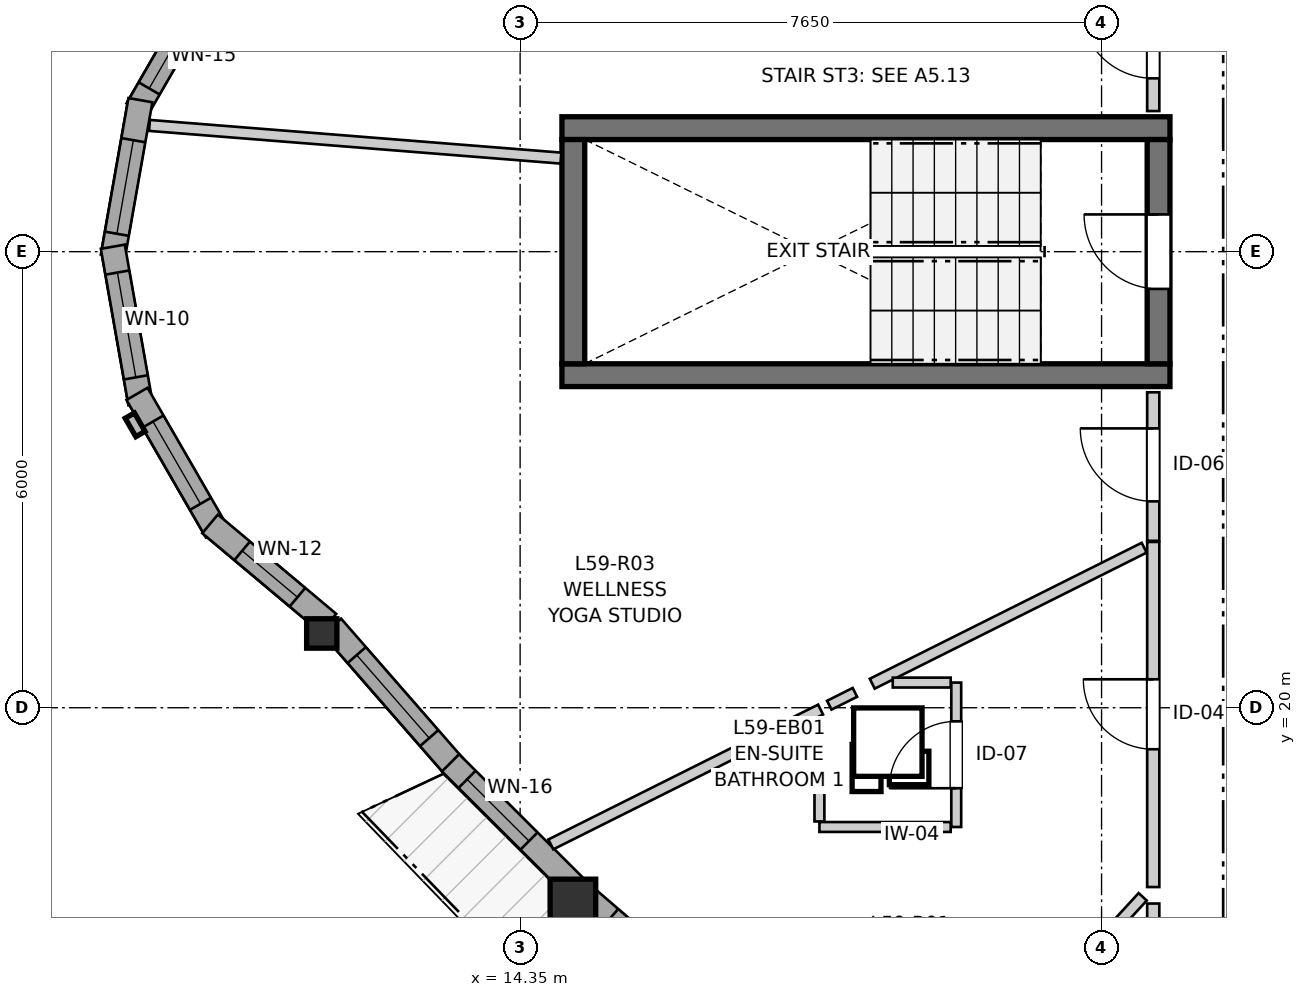
"""IFC4 building model, lengths in metres.
Left out: names, types, materials, properties, quantities, classifications, styles, units other than length and angle.
Written with IfcOpenShell. Run it as: python <this file> out.ifc"""

import sys

from ifc_helpers import new_model, si_unit, direction, frame, frame_2d, origin, origin_2d, place, context, subcontext, project, spatial, rectangle, i_section, extrude, source, transform, mapped, element, fill, save


model = new_model("IFC4")
c1 = context("Model", 3, precision=1e-05, world=origin(), true_north=direction((0.0, 1.0)))
c2 = subcontext(c1, "Body", "Model", "MODEL_VIEW")
j1 = project(units=[si_unit("LENGTHUNIT", "METRE"), si_unit("PLANEANGLEUNIT", "RADIAN")], contexts=[c1])
p1 = place(None, origin())
s1 = spatial("IfcSite", under=j1, at=p1, CompositionType="ELEMENT")
p2 = place(p1, origin())
s2 = spatial("IfcBuilding", under=s1, at=p2, CompositionType="ELEMENT")
p3 = place(p2, frame((0.0, 0.0, 198.8)))
s3 = spatial("IfcBuildingStorey", under=s2, at=p3, CompositionType="ELEMENT", Elevation=198.8)
for number, where, z_axis, x_axis in (
    (1, (14.9, 24.375, 0.0), (0.0, 0.0, 1.0), (1.0, 0.0, 0.0)),
    (2, (22.9, 27.625, 0.0), (0.0, 0.0, 1.0), (-1.0, 0.0, 0.0)),
):
    element("IfcWall", number, at=place(p3, frame(where, z_axis=z_axis, x_axis=x_axis)), inside=s3, PredefinedType="SHEAR", context=c2, shape_type="SweptSolid", body=[
        extrude(rectangle(XDim=8.0, YDim=0.3, at=frame_2d((4.0, 0.0))), origin(), (0.0, 0.0, 1.0), 2.96),
    ])
p4 = place(p3, frame((15.05, 27.475, 0.0), z_axis=(0.0, 0.0, 1.0), x_axis=(0.0, -1.0, 0.0)))
e3 = element("IfcWall", 3, at=p4, inside=s3, PredefinedType="SHEAR", context=c2, shape_type="SweptSolid", body=[
    extrude(rectangle(XDim=2.95, YDim=0.3, at=frame_2d((1.475, 0.0))), origin(), (0.0, 0.0, 1.0), 2.96),
])
p5 = place(p3, frame((22.75, 24.525, 0.0), z_axis=(0.0, 0.0, 1.0), x_axis=(0.0, 1.0, 0.0)))
e4 = element("IfcWall", 4, at=p5, inside=s3, PredefinedType="SHEAR", context=c2, shape_type="SweptSolid", body=[
    extrude(rectangle(XDim=2.95, YDim=0.3, at=frame_2d((1.475, 0.0))), origin(), (0.0, 0.0, 1.0), 2.96),
])
p6 = place(p5, frame((0.985, 0.0, 0.0)))
e5 = element("IfcOpeningElement", 5, at=p6, cuts=e4, PredefinedType="OPENING", context=c2, shape_type="SweptSolid", body=[
    extrude(rectangle(XDim=0.98, YDim=2.15, at=frame_2d((0.49, 1.075))), frame((0.0, 0.16, 0.0), z_axis=(0.0, -1.0, 0.0), x_axis=(1.0, 0.0, 0.0)), (0.0, 0.0, 1.0), 0.32),
])
m1 = source(origin(), c2, "Body", "SweptSolid", [
    extrude(i_section(OverallWidth=0.398, OverallDepth=0.387, WebThickness=0.019, FlangeThickness=0.03, FilletRadius=0.015, at=origin_2d()), origin(), (0.0, 0.0, 1.0), 2.96),
])
p7 = place(p3, frame((11.74, 20.977, 0.0), z_axis=(0.0, 0.0, 1.0), x_axis=(1.0, 0.0, 0.0)))
e6 = element("IfcColumn", 6, at=p7, inside=s3, PredefinedType="PILASTER", context=c2, shape_type="MappedRepresentation", body=[
    mapped(m1, transform((0.0, 0.0, 0.0), x_axis=(1.0, 0.0, 0.0), y_axis=(0.0, 1.0, 0.0), z_axis=(0.0, 0.0, 1.0), scale=1.0)),
])
m2 = source(origin(), c2, "Body", "SweptSolid", [
    extrude(rectangle(XDim=0.6, YDim=0.6, at=origin_2d()), origin(), (0.0, 0.0, 1.0), 2.96),
])
p8 = place(p3, frame((15.044, 17.445, 0.0), z_axis=(0.0, 0.0, 1.0), x_axis=(1.0, 0.0, 0.0)))
e7 = element("IfcColumn", 7, at=p8, inside=s3, PredefinedType="COLUMN", context=c2, shape_type="MappedRepresentation", body=[
    mapped(m2, transform((0.0, 0.0, 0.0), x_axis=(1.0, 0.0, 0.0), y_axis=(0.0, 1.0, 0.0), z_axis=(0.0, 0.0, 1.0), scale=1.0)),
])
p9 = place(p3, frame((10.354, 29.681, 0.0), z_axis=(0.0, 0.0, 1.0), x_axis=(-0.499995423472, -0.866028046028, 0.0)))
e8 = element("IfcWall", 8, at=p9, inside=s3, PredefinedType="SOLIDWALL", context=c2, shape_type="SweptSolid", body=[
    extrude(rectangle(XDim=2.09, YDim=0.32, at=frame_2d((1.045, 0.0))), origin(), (0.0, 0.0, 1.0), 2.58),
])
p10 = place(p9, frame((0.32, 0.0, 0.82)))
e9 = element("IfcOpeningElement", 9, at=p10, cuts=e8, PredefinedType="OPENING", context=c2, shape_type="SweptSolid", body=[
    extrude(rectangle(XDim=1.45, YDim=1.25, at=frame_2d((0.725, 0.625))), frame((0.0, 0.17, 0.0), z_axis=(0.0, -1.0, 0.0), x_axis=(1.0, 0.0, 0.0)), (0.0, 0.0, 1.0), 0.34),
])
p11 = place(p3, frame((9.354, 27.993, 0.0), z_axis=(0.0, 0.0, 1.0), x_axis=(-0.173672066494, -0.984803540469, 0.0)))
e10 = element("IfcWall", 10, at=p11, inside=s3, PredefinedType="SOLIDWALL", context=c2, shape_type="SweptSolid", body=[
    extrude(rectangle(XDim=2.09, YDim=0.32, at=frame_2d((1.045, 0.0))), origin(), (0.0, 0.0, 1.0), 2.58),
])
p12 = place(p11, frame((0.535, 0.0, 0.82)))
e11 = element("IfcOpeningElement", 11, at=p12, cuts=e10, PredefinedType="OPENING", context=c2, shape_type="SweptSolid", body=[
    extrude(rectangle(XDim=1.25, YDim=1.35, at=frame_2d((0.625, 0.675))), frame((0.0, 0.17, 0.0), z_axis=(0.0, -1.0, 0.0), x_axis=(1.0, 0.0, 0.0)), (0.0, 0.0, 1.0), 0.34),
])
p13 = place(p3, frame((8.991, 26.065, 0.0), z_axis=(0.0, 0.0, 1.0), x_axis=(0.173672066494, -0.984803540469, 0.0)))
e12 = element("IfcWall", 12, at=p13, inside=s3, PredefinedType="SOLIDWALL", context=c2, shape_type="SweptSolid", body=[
    extrude(rectangle(XDim=2.09, YDim=0.32, at=frame_2d((1.045, 0.0))), origin(), (0.0, 0.0, 1.0), 2.58),
])
p14 = place(p13, frame((0.345, 0.0, 0.82)))
e13 = element("IfcOpeningElement", 13, at=p14, cuts=e12, PredefinedType="OPENING", context=c2, shape_type="SweptSolid", body=[
    extrude(rectangle(XDim=1.4, YDim=1.35, at=frame_2d((0.7, 0.675))), frame((0.0, 0.17, 0.0), z_axis=(0.0, -1.0, 0.0), x_axis=(1.0, 0.0, 0.0)), (0.0, 0.0, 1.0), 0.34),
])
p15 = place(p3, frame((9.309, 24.129, 0.0), z_axis=(0.0, 0.0, 1.0), x_axis=(0.499995423472, -0.866028046028, 0.0)))
e14 = element("IfcWall", 14, at=p15, inside=s3, PredefinedType="SOLIDWALL", context=c2, shape_type="SweptSolid", body=[
    extrude(rectangle(XDim=2.09, YDim=0.32, at=frame_2d((1.045, 0.0))), origin(), (0.0, 0.0, 1.0), 2.58),
])
p16 = place(p15, frame((0.42, 0.0, 0.82)))
e15 = element("IfcOpeningElement", 15, at=p16, cuts=e14, PredefinedType="OPENING", context=c2, shape_type="SweptSolid", body=[
    extrude(rectangle(XDim=1.25, YDim=1.35, at=frame_2d((0.625, 0.675))), frame((0.0, 0.17, 0.0), z_axis=(0.0, -1.0, 0.0), x_axis=(1.0, 0.0, 0.0)), (0.0, 0.0, 1.0), 0.34),
])
p17 = place(p3, frame((10.271, 22.419, 0.0), z_axis=(0.0, 0.0, 1.0), x_axis=(0.766099948115, -0.642721455608, 0.0)))
e16 = element("IfcWall", 16, at=p17, inside=s3, PredefinedType="SOLIDWALL", context=c2, shape_type="SweptSolid", body=[
    extrude(rectangle(XDim=2.032, YDim=0.32, at=frame_2d((1.016, 0.0))), origin(), (0.0, 0.0, 1.0), 2.58),
])
p18 = place(p17, frame((0.551, 0.0, 0.82)))
e17 = element("IfcOpeningElement", 17, at=p18, cuts=e16, PredefinedType="OPENING", context=c2, shape_type="SweptSolid", body=[
    extrude(rectangle(XDim=0.95, YDim=1.35, at=frame_2d((0.475, 0.675))), frame((0.0, 0.17, 0.0), z_axis=(0.0, -1.0, 0.0), x_axis=(1.0, 0.0, 0.0)), (0.0, 0.0, 1.0), 0.34),
])
p19 = place(p3, frame((11.874, 21.067, 0.0), z_axis=(0.0, 0.0, 1.0), x_axis=(0.657571063417, -0.753392524888, 0.0)))
e18 = element("IfcWall", 18, at=p19, inside=s3, PredefinedType="SOLIDWALL", context=c2, shape_type="SweptSolid", body=[
    extrude(rectangle(XDim=2.464, YDim=0.32, at=frame_2d((1.232, 0.0))), origin(), (0.0, 0.0, 1.0), 2.58),
])
p20 = place(p19, frame((0.497, 0.0, 0.82)))
e19 = element("IfcOpeningElement", 19, at=p20, cuts=e18, PredefinedType="OPENING", context=c2, shape_type="SweptSolid", body=[
    extrude(rectangle(XDim=1.45, YDim=1.25, at=frame_2d((0.725, 0.625))), frame((0.0, 0.17, 0.0), z_axis=(0.0, -1.0, 0.0), x_axis=(1.0, 0.0, 0.0)), (0.0, 0.0, 1.0), 0.34),
])
p21 = place(p3, frame((13.434, 19.275, 0.0), z_axis=(0.0, 0.0, 1.0), x_axis=(0.708408377073, -0.705802784985, 0.0)))
e20 = element("IfcWall", 20, at=p21, inside=s3, PredefinedType="SOLIDWALL", context=c2, shape_type="SweptSolid", body=[
    extrude(rectangle(XDim=2.343, YDim=0.32, at=frame_2d((1.171, 0.0))), origin(), (0.0, 0.0, 1.0), 2.58),
])
p22 = place(p21, frame((0.308, 0.0, 0.82)))
e21 = element("IfcOpeningElement", 21, at=p22, cuts=e20, PredefinedType="OPENING", context=c2, shape_type="SweptSolid", body=[
    extrude(rectangle(XDim=1.15, YDim=1.2, at=frame_2d((0.575, 0.6))), frame((0.0, 0.17, 0.0), z_axis=(0.0, -1.0, 0.0), x_axis=(1.0, 0.0, 0.0)), (0.0, 0.0, 1.0), 0.34),
])
p23 = place(p3, frame((15.217, 17.507, 0.0), z_axis=(0.0, 0.0, 1.0), x_axis=(0.757473216355, -0.652866239366, 0.0)))
e22 = element("IfcWall", 22, at=p23, inside=s3, PredefinedType="SOLIDWALL", context=c2, shape_type="SweptSolid", body=[
    extrude(rectangle(XDim=2.303, YDim=0.32, at=frame_2d((1.152, 0.0))), origin(), (0.0, 0.0, 1.0), 2.58),
])
p24 = place(p23, frame((0.422, 0.0, 0.82)))
e23 = element("IfcOpeningElement", 23, at=p24, cuts=e22, PredefinedType="OPENING", context=c2, shape_type="SweptSolid", body=[
    extrude(rectangle(XDim=1.45, YDim=1.25, at=frame_2d((0.725, 0.625))), frame((0.0, 0.17, 0.0), z_axis=(0.0, -1.0, 0.0), x_axis=(1.0, 0.0, 0.0)), (0.0, 0.0, 1.0), 0.34),
])
p25 = place(p3, frame((22.68, 17.641, 0.0), z_axis=(0.0, 0.0, 1.0), x_axis=(0.0, 1.0, 0.0)))
e24 = element("IfcWall", 24, at=p25, inside=s3, PredefinedType="PARTITIONING", context=c2, shape_type="SweptSolid", body=[
    extrude(rectangle(XDim=4.54, YDim=0.16, at=frame_2d((2.27, 0.0))), origin(), (0.0, 0.0, 1.0), 2.96),
])
p26 = place(p25, frame((1.813, 0.0, 0.0)))
e25 = element("IfcOpeningElement", 25, at=p26, cuts=e24, PredefinedType="OPENING", context=c2, shape_type="SweptSolid", body=[
    extrude(rectangle(XDim=0.92, YDim=2.1, at=frame_2d((0.46, 1.05))), frame((0.0, 0.09, 0.0), z_axis=(0.0, -1.0, 0.0), x_axis=(1.0, 0.0, 0.0)), (0.0, 0.0, 1.0), 0.18),
])
p27 = place(p3, frame((22.68, 22.196, 0.0), z_axis=(0.0, 0.0, 1.0), x_axis=(0.0, 1.0, 0.0)))
e26 = element("IfcWall", 26, at=p27, inside=s3, PredefinedType="PARTITIONING", context=c2, shape_type="SweptSolid", body=[
    extrude(rectangle(XDim=1.954, YDim=0.16, at=frame_2d((0.977, 0.0))), origin(), (0.0, 0.0, 1.0), 2.96),
])
p28 = place(p27, frame((0.519, 0.0, 0.0)))
e27 = element("IfcOpeningElement", 27, at=p28, cuts=e26, PredefinedType="OPENING", context=c2, shape_type="SweptSolid", body=[
    extrude(rectangle(XDim=0.96, YDim=2.1, at=frame_2d((0.48, 1.05))), frame((0.0, 0.09, 0.0), z_axis=(0.0, -1.0, 0.0), x_axis=(1.0, 0.0, 0.0)), (0.0, 0.0, 1.0), 0.18),
])
p29 = place(p3, frame((20.088, 18.431, 0.0), z_axis=(0.0, 0.0, 1.0), x_axis=(0.0, 1.0, 0.0)))
e28 = element("IfcWall", 28, at=p29, inside=s3, PredefinedType="PARTITIONING", context=c2, shape_type="SweptSolid", body=[
    extrude(rectangle(XDim=1.9, YDim=0.13, at=frame_2d((0.95, 0.0))), origin(), (0.0, 0.0, 1.0), 2.96),
])
p30 = place(p29, frame((0.51, 0.0, 0.0)))
e29 = element("IfcOpeningElement", 29, at=p30, cuts=e28, PredefinedType="OPENING", context=c2, shape_type="SweptSolid", body=[
    extrude(rectangle(XDim=0.88, YDim=2.05, at=frame_2d((0.44, 1.025))), frame((0.0, 0.075, 0.0), z_axis=(0.0, -1.0, 0.0), x_axis=(1.0, 0.0, 0.0)), (0.0, 0.0, 1.0), 0.15),
])
p31 = place(p3, frame((22.68, 27.85, 0.0), z_axis=(0.0, 0.0, 1.0), x_axis=(0.0, 1.0, 0.0)))
e30 = element("IfcWall", 30, at=p31, inside=s3, PredefinedType="PARTITIONING", context=c2, shape_type="SweptSolid", body=[
    extrude(rectangle(XDim=1.731, YDim=0.16, at=frame_2d((0.865, 0.0))), origin(), (0.0, 0.0, 1.0), 2.96),
])
p32 = place(p31, frame((0.43, 0.0, 0.0)))
e31 = element("IfcOpeningElement", 31, at=p32, cuts=e30, PredefinedType="OPENING", context=c2, shape_type="SweptSolid", body=[
    extrude(rectangle(XDim=0.96, YDim=2.1, at=frame_2d((0.48, 1.05))), frame((0.0, 0.09, 0.0), z_axis=(0.0, -1.0, 0.0), x_axis=(1.0, 0.0, 0.0)), (0.0, 0.0, 1.0), 0.18),
])
p33 = place(p3, frame((9.473, 27.661, 0.0), z_axis=(0.0, 0.0, 1.0), x_axis=(0.996864548282, -0.079126938392, 0.0)))
e32 = element("IfcWall", 32, at=p33, inside=s3, PredefinedType="PARTITIONING", context=c2, shape_type="SweptSolid", body=[
    extrude(rectangle(XDim=5.43, YDim=0.145, at=frame_2d((2.715, 0.0))), origin(), (0.0, 0.0, 1.0), 2.96),
])
p34 = place(p3, frame((19.625, 14.343, 0.0), z_axis=(0.0, 0.0, 1.0), x_axis=(0.677104421975, 0.735886949023, 0.0)))
e33 = element("IfcWall", 33, at=p34, inside=s3, PredefinedType="PARTITIONING", context=c2, shape_type="SweptSolid", body=[
    extrude(rectangle(XDim=4.307, YDim=0.145, at=frame_2d((2.153, 0.0))), origin(), (0.0, 0.0, 1.0), 2.96),
])
p35 = place(p3, frame((18.983, 20.316, 0.0), z_axis=(0.0, 0.0, 1.0), x_axis=(0.894366146285, 0.447335664104, 0.0)))
e34 = element("IfcWall", 34, at=p35, inside=s3, PredefinedType="PARTITIONING", context=c2, shape_type="SweptSolid", body=[
    extrude(rectangle(XDim=4.0, YDim=0.145, at=frame_2d((2.0, 0.0))), origin(), (0.0, 0.0, 1.0), 2.96),
])
p36 = place(p3, frame((14.754, 18.202, 0.0), z_axis=(0.0, 0.0, 1.0), x_axis=(0.894464106055, 0.44713975777, 0.0)))
e35 = element("IfcWall", 35, at=p36, inside=s3, PredefinedType="PARTITIONING", context=c2, shape_type="SweptSolid", body=[
    extrude(rectangle(XDim=3.968, YDim=0.145, at=frame_2d((1.984, 0.0))), origin(), (0.0, 0.0, 1.0), 2.96),
])
p37 = place(p3, frame((22.68, 15.796, 0.0), z_axis=(0.0, 0.0, 1.0), x_axis=(0.0, 1.0, 0.0)))
e36 = element("IfcWall", 36, at=p37, inside=s3, PredefinedType="PARTITIONING", context=c2, shape_type="SweptSolid", body=[
    extrude(rectangle(XDim=1.628, YDim=0.16, at=frame_2d((0.814, 0.0))), origin(), (0.0, 0.0, 1.0), 2.96),
])
p38 = place(p3, frame((18.288, 18.431, 0.0), z_axis=(0.0, 0.0, 1.0), x_axis=(1.0, 0.0, 0.0)))
e37 = element("IfcWall", 37, at=p38, inside=s3, PredefinedType="PARTITIONING", context=c2, shape_type="SweptSolid", body=[
    extrude(rectangle(XDim=1.727, YDim=0.13, at=frame_2d((0.863, 0.0))), origin(), (0.0, 0.0, 1.0), 2.96),
])
p39 = place(p3, frame((18.288, 18.504, 0.0), z_axis=(0.0, 0.0, 1.0), x_axis=(0.0, 1.0, 0.0)))
e38 = element("IfcWall", 38, at=p39, inside=s3, PredefinedType="PARTITIONING", context=c2, shape_type="SweptSolid", body=[
    extrude(rectangle(XDim=1.344, YDim=0.13, at=frame_2d((0.672, 0.0))), origin(), (0.0, 0.0, 1.0), 2.96),
])
p40 = place(p3, frame((19.253, 20.331, 0.0), z_axis=(0.0, 0.0, 1.0), x_axis=(1.0, 0.0, 0.0)))
e39 = element("IfcWall", 39, at=p40, inside=s3, PredefinedType="PARTITIONING", context=c2, shape_type="SweptSolid", body=[
    extrude(rectangle(XDim=0.762, YDim=0.13, at=frame_2d((0.381, 0.0))), origin(), (0.0, 0.0, 1.0), 2.96),
])
p41 = place(p3, frame((18.417, 20.033, 0.0), z_axis=(0.0, 0.0, 1.0), x_axis=(0.894427191, 0.4472135955, 0.0)))
e40 = element("IfcWall", 40, at=p41, inside=s3, PredefinedType="PARTITIONING", context=c2, shape_type="SweptSolid", body=[
    extrude(rectangle(XDim=0.377, YDim=0.13, at=frame_2d((0.188, 0.0))), origin(), (0.0, 0.0, 1.0), 2.96),
])
m3 = source(origin(), c2, "Body", "SweptSolid", [
    extrude(rectangle(XDim=1.45, YDim=1.25, at=frame_2d((0.725, 0.625))), frame((0.0, 0.03, 0.0), z_axis=(0.0, -1.0, 0.0), x_axis=(1.0, 0.0, 0.0)), (0.0, 0.0, 1.0), 0.06),
])
p42 = place(p10, origin())
e41 = element("IfcWindow", 41, at=p42, inside=s3, PartitioningType="SINGLE_PANEL", PredefinedType="WINDOW", context=c2, shape_type="MappedRepresentation", body=[
    mapped(m3, transform((0.0, 0.0, 0.0), x_axis=(1.0, 0.0, 0.0), y_axis=(0.0, 1.0, 0.0), z_axis=(0.0, 0.0, 1.0), scale=1.0)),
])
fill(e9, e41)
m4 = source(origin(), c2, "Body", "SweptSolid", [
    extrude(rectangle(XDim=1.25, YDim=1.35, at=frame_2d((0.625, 0.675))), frame((0.0, 0.03, 0.0), z_axis=(0.0, -1.0, 0.0), x_axis=(1.0, 0.0, 0.0)), (0.0, 0.0, 1.0), 0.06),
])
p43 = place(p12, origin())
e42 = element("IfcWindow", 42, at=p43, inside=s3, PartitioningType="SINGLE_PANEL", PredefinedType="WINDOW", context=c2, shape_type="MappedRepresentation", body=[
    mapped(m4, transform((0.0, 0.0, 0.0), x_axis=(1.0, 0.0, 0.0), y_axis=(0.0, 1.0, 0.0), z_axis=(0.0, 0.0, 1.0), scale=1.0)),
])
fill(e11, e42)
m5 = source(origin(), c2, "Body", "SweptSolid", [
    extrude(rectangle(XDim=1.4, YDim=1.35, at=frame_2d((0.7, 0.675))), frame((0.0, 0.03, 0.0), z_axis=(0.0, -1.0, 0.0), x_axis=(1.0, 0.0, 0.0)), (0.0, 0.0, 1.0), 0.06),
])
p44 = place(p14, origin())
e43 = element("IfcWindow", 43, at=p44, inside=s3, PartitioningType="SINGLE_PANEL", PredefinedType="WINDOW", context=c2, shape_type="MappedRepresentation", body=[
    mapped(m5, transform((0.0, 0.0, 0.0), x_axis=(1.0, 0.0, 0.0), y_axis=(0.0, 1.0, 0.0), z_axis=(0.0, 0.0, 1.0), scale=1.0)),
])
fill(e13, e43)
p45 = place(p16, origin())
e44 = element("IfcWindow", 44, at=p45, inside=s3, PartitioningType="SINGLE_PANEL", PredefinedType="WINDOW", context=c2, shape_type="MappedRepresentation", body=[
    mapped(m4, transform((0.0, 0.0, 0.0), x_axis=(1.0, 0.0, 0.0), y_axis=(0.0, 1.0, 0.0), z_axis=(0.0, 0.0, 1.0), scale=1.0)),
])
fill(e15, e44)
m6 = source(origin(), c2, "Body", "SweptSolid", [
    extrude(rectangle(XDim=0.95, YDim=1.35, at=frame_2d((0.475, 0.675))), frame((0.0, 0.03, 0.0), z_axis=(0.0, -1.0, 0.0), x_axis=(1.0, 0.0, 0.0)), (0.0, 0.0, 1.0), 0.06),
])
p46 = place(p18, origin())
e45 = element("IfcWindow", 45, at=p46, inside=s3, PartitioningType="SINGLE_PANEL", PredefinedType="WINDOW", context=c2, shape_type="MappedRepresentation", body=[
    mapped(m6, transform((0.0, 0.0, 0.0), x_axis=(1.0, 0.0, 0.0), y_axis=(0.0, 1.0, 0.0), z_axis=(0.0, 0.0, 1.0), scale=1.0)),
])
fill(e17, e45)
p47 = place(p20, origin())
e46 = element("IfcWindow", 46, at=p47, inside=s3, PartitioningType="SINGLE_PANEL", PredefinedType="WINDOW", context=c2, shape_type="MappedRepresentation", body=[
    mapped(m3, transform((0.0, 0.0, 0.0), x_axis=(1.0, 0.0, 0.0), y_axis=(0.0, 1.0, 0.0), z_axis=(0.0, 0.0, 1.0), scale=1.0)),
])
fill(e19, e46)
m7 = source(origin(), c2, "Body", "SweptSolid", [
    extrude(rectangle(XDim=1.15, YDim=1.2, at=frame_2d((0.575, 0.6))), frame((0.0, 0.03, 0.0), z_axis=(0.0, -1.0, 0.0), x_axis=(1.0, 0.0, 0.0)), (0.0, 0.0, 1.0), 0.06),
])
p48 = place(p22, origin())
e47 = element("IfcWindow", 47, at=p48, inside=s3, PartitioningType="SINGLE_PANEL", PredefinedType="WINDOW", context=c2, shape_type="MappedRepresentation", body=[
    mapped(m7, transform((0.0, 0.0, 0.0), x_axis=(1.0, 0.0, 0.0), y_axis=(0.0, 1.0, 0.0), z_axis=(0.0, 0.0, 1.0), scale=1.0)),
])
fill(e21, e47)
p49 = place(p24, origin())
e48 = element("IfcWindow", 48, at=p49, inside=s3, PartitioningType="SINGLE_PANEL", PredefinedType="WINDOW", context=c2, shape_type="MappedRepresentation", body=[
    mapped(m3, transform((0.0, 0.0, 0.0), x_axis=(1.0, 0.0, 0.0), y_axis=(0.0, 1.0, 0.0), z_axis=(0.0, 0.0, 1.0), scale=1.0)),
])
fill(e23, e48)
m8 = source(origin(), c2, "Body", "SweptSolid", [
    extrude(rectangle(XDim=0.98, YDim=2.15, at=frame_2d((0.49, 1.075))), frame((0.0, 0.025, 0.0), z_axis=(0.0, -1.0, 0.0), x_axis=(1.0, 0.0, 0.0)), (0.0, 0.0, 1.0), 0.05),
])
p50 = place(p6, origin())
e49 = element("IfcDoor", 49, at=p50, inside=s3, OperationType="SINGLE_SWING_RIGHT", PredefinedType="DOOR", context=c2, shape_type="MappedRepresentation", body=[
    mapped(m8, transform((0.0, 0.0, 0.0), x_axis=(1.0, 0.0, 0.0), y_axis=(0.0, 1.0, 0.0), z_axis=(0.0, 0.0, 1.0), scale=1.0)),
])
fill(e5, e49)
m9 = source(origin(), c2, "Body", "SweptSolid", [
    extrude(rectangle(XDim=0.92, YDim=2.1, at=frame_2d((0.46, 1.05))), frame((0.0, 0.025, 0.0), z_axis=(0.0, -1.0, 0.0), x_axis=(1.0, 0.0, 0.0)), (0.0, 0.0, 1.0), 0.05),
])
p51 = place(p26, origin())
e50 = element("IfcDoor", 50, at=p51, inside=s3, OperationType="SINGLE_SWING_RIGHT", PredefinedType="DOOR", context=c2, shape_type="MappedRepresentation", body=[
    mapped(m9, transform((0.0, 0.0, 0.0), x_axis=(1.0, 0.0, 0.0), y_axis=(0.0, 1.0, 0.0), z_axis=(0.0, 0.0, 1.0), scale=1.0)),
])
fill(e25, e50)
m10 = source(origin(), c2, "Body", "SweptSolid", [
    extrude(rectangle(XDim=0.96, YDim=2.1, at=frame_2d((0.48, 1.05))), frame((0.0, 0.025, 0.0), z_axis=(0.0, -1.0, 0.0), x_axis=(1.0, 0.0, 0.0)), (0.0, 0.0, 1.0), 0.05),
])
p52 = place(p28, origin())
e51 = element("IfcDoor", 51, at=p52, inside=s3, OperationType="SINGLE_SWING_RIGHT", PredefinedType="DOOR", context=c2, shape_type="MappedRepresentation", body=[
    mapped(m10, transform((0.0, 0.0, 0.0), x_axis=(1.0, 0.0, 0.0), y_axis=(0.0, 1.0, 0.0), z_axis=(0.0, 0.0, 1.0), scale=1.0)),
])
fill(e27, e51)
m11 = source(origin(), c2, "Body", "SweptSolid", [
    extrude(rectangle(XDim=0.88, YDim=2.05, at=frame_2d((0.44, 1.025))), frame((0.0, 0.025, 0.0), z_axis=(0.0, -1.0, 0.0), x_axis=(1.0, 0.0, 0.0)), (0.0, 0.0, 1.0), 0.05),
])
p53 = place(p30, origin())
e52 = element("IfcDoor", 52, at=p53, inside=s3, OperationType="SINGLE_SWING_LEFT", PredefinedType="DOOR", context=c2, shape_type="MappedRepresentation", body=[
    mapped(m11, transform((0.0, 0.0, 0.0), x_axis=(1.0, 0.0, 0.0), y_axis=(0.0, 1.0, 0.0), z_axis=(0.0, 0.0, 1.0), scale=1.0)),
])
fill(e29, e52)
p54 = place(p32, origin())
e53 = element("IfcDoor", 53, at=p54, inside=s3, OperationType="SINGLE_SWING_RIGHT", PredefinedType="DOOR", context=c2, shape_type="MappedRepresentation", body=[
    mapped(m10, transform((0.0, 0.0, 0.0), x_axis=(1.0, 0.0, 0.0), y_axis=(0.0, 1.0, 0.0), z_axis=(0.0, 0.0, 1.0), scale=1.0)),
])
fill(e31, e53)
save(model, sys.argv[1])
